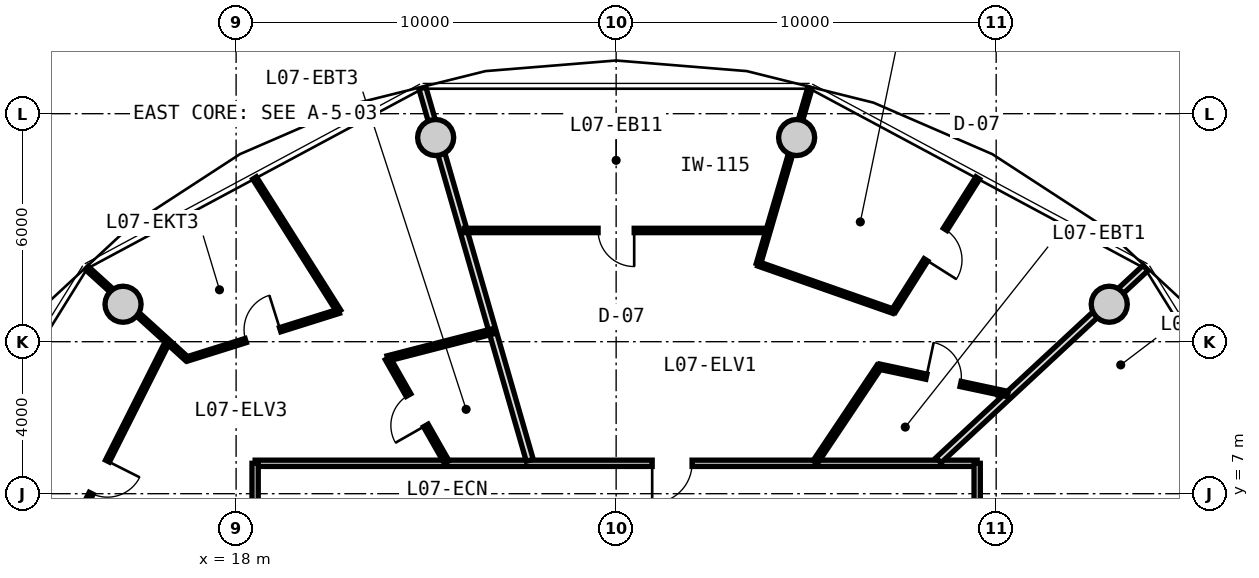
"""IFC4 building model, lengths in metres.
Left out: names, types, materials, properties, quantities, classifications, styles, units other than length and angle.
Written with IfcOpenShell. Run it as: python <this file> out.ifc"""

import sys

from ifc_helpers import new_model, si_unit, direction, frame, frame_2d, origin, origin_2d, place, context, subcontext, project, spatial, rectangle, circle, extrude, source, transform, mapped, element, fill, save


model = new_model("IFC4")
c1 = context("Model", 3, precision=1e-05, world=origin(), true_north=direction((0.0, 1.0)))
c2 = subcontext(c1, "Body", "Model", "MODEL_VIEW")
j1 = project(units=[si_unit("LENGTHUNIT", "METRE"), si_unit("PLANEANGLEUNIT", "RADIAN")], contexts=[c1])
p1 = place(None, origin())
s1 = spatial("IfcSite", under=j1, at=p1, CompositionType="ELEMENT")
p2 = place(p1, origin())
s2 = spatial("IfcBuilding", under=s1, at=p2, CompositionType="ELEMENT")
p3 = place(p2, frame((0.0, 0.0, 27.7)))
s3 = spatial("IfcBuildingStorey", under=s2, at=p3, CompositionType="ELEMENT", Elevation=27.7)
m1 = source(origin(), c2, "Body", "SweptSolid", [
    extrude(circle(Radius=0.475, at=origin_2d()), origin(), (0.0, 0.0, 1.0), 3.05),
])
for number, where, z_axis, x_axis in (
    (1, (40.975, 11.985, 0.0), (0.0, 0.0, 1.0), (1.0, 0.0, 0.0)),
    (2, (32.749, 16.373, 0.0), (0.0, 0.0, 1.0), (1.0, 0.0, 0.0)),
    (3, (23.251, 16.373, 0.0), (0.0, 0.0, 1.0), (1.0, 0.0, 0.0)),
    (4, (15.025, 11.985, 0.0), (0.0, 0.0, 1.0), (1.0, 0.0, 0.0)),
):
    element("IfcColumn", number, at=place(p3, frame(where, z_axis=z_axis, x_axis=x_axis)), inside=s3, PredefinedType="COLUMN", context=c2, shape_type="MappedRepresentation", body=[
        mapped(m1, transform((0.0, 0.0, 0.0), x_axis=(1.0, 0.0, 0.0), y_axis=(0.0, 1.0, 0.0), z_axis=(0.0, 0.0, 1.0), scale=1.0)),
    ])
m2 = source(origin(), c2, "Body", "SweptSolid", [
    extrude(rectangle(XDim=19.0, YDim=0.165, at=frame_2d((9.5, 0.0))), origin(), (0.0, 0.0, 1.0), 2.775),
])
p4 = place(p3, frame((18.5, 7.8, 0.0), z_axis=(0.0, 0.0, 1.0), x_axis=(1.0, 0.0, 0.0)))
e5 = element("IfcWall", 5, at=p4, inside=s3, PredefinedType="PARTITIONING", context=c2, shape_type="MappedRepresentation", body=[
    mapped(m2, transform((0.0, 0.0, 0.0), x_axis=(1.0, 0.0, 0.0), y_axis=(0.0, 1.0, 0.0), z_axis=(0.0, 0.0, 1.0), scale=1.0)),
])
p5 = place(p4, frame((10.448, 0.0, 0.0)))
e6 = element("IfcOpeningElement", 6, at=p5, cuts=e5, PredefinedType="OPENING", context=c2, shape_type="SweptSolid", body=[
    extrude(rectangle(XDim=1.05, YDim=2.15, at=frame_2d((0.525, 1.075))), frame((0.0, 0.093, 0.0), z_axis=(0.0, -1.0, 0.0), x_axis=(1.0, 0.0, 0.0)), (0.0, 0.0, 1.0), 0.185),
])
m3 = source(origin(), c2, "Body", "SweptSolid", [
    extrude(rectangle(XDim=15.6, YDim=0.165, at=frame_2d((7.8, 0.0))), origin(), (0.0, 0.0, 1.0), 2.775),
])
p6 = place(p3, frame((18.5, -7.8, 0.0), z_axis=(0.0, 0.0, 1.0), x_axis=(0.0, 1.0, 0.0)))
e7 = element("IfcWall", 7, at=p6, inside=s3, PredefinedType="PARTITIONING", context=c2, shape_type="MappedRepresentation", body=[
    mapped(m3, transform((0.0, 0.0, 0.0), x_axis=(1.0, 0.0, 0.0), y_axis=(0.0, 1.0, 0.0), z_axis=(0.0, 0.0, 1.0), scale=1.0)),
])
p7 = place(p6, frame((12.241, 0.0, 0.0)))
e8 = element("IfcOpeningElement", 8, at=p7, cuts=e7, PredefinedType="OPENING", context=c2, shape_type="SweptSolid", body=[
    extrude(rectangle(XDim=1.05, YDim=2.15, at=frame_2d((0.525, 1.075))), frame((0.0, 0.093, 0.0), z_axis=(0.0, -1.0, 0.0), x_axis=(1.0, 0.0, 0.0)), (0.0, 0.0, 1.0), 0.185),
])
p8 = place(p6, frame((3.63, 0.0, 0.0)))
e9 = element("IfcOpeningElement", 9, at=p8, cuts=e7, PredefinedType="OPENING", context=c2, shape_type="SweptSolid", body=[
    extrude(rectangle(XDim=1.05, YDim=2.15, at=frame_2d((0.525, 1.075))), frame((0.0, 0.093, 0.0), z_axis=(0.0, -1.0, 0.0), x_axis=(1.0, 0.0, 0.0)), (0.0, 0.0, 1.0), 0.185),
])
p9 = place(p3, frame((37.5, 7.8, 0.0), z_axis=(0.0, 0.0, 1.0), x_axis=(0.0, -1.0, 0.0)))
e10 = element("IfcWall", 10, at=p9, inside=s3, PredefinedType="PARTITIONING", context=c2, shape_type="MappedRepresentation", body=[
    mapped(m3, transform((0.0, 0.0, 0.0), x_axis=(1.0, 0.0, 0.0), y_axis=(0.0, 1.0, 0.0), z_axis=(0.0, 0.0, 1.0), scale=1.0)),
])
p10 = place(p9, frame((12.141, 0.0, 0.0)))
e11 = element("IfcOpeningElement", 11, at=p10, cuts=e10, PredefinedType="OPENING", context=c2, shape_type="SweptSolid", body=[
    extrude(rectangle(XDim=1.25, YDim=2.2, at=frame_2d((0.625, 1.1))), frame((0.0, 0.093, 0.0), z_axis=(0.0, -1.0, 0.0), x_axis=(1.0, 0.0, 0.0)), (0.0, 0.0, 1.0), 0.185),
])
p11 = place(p9, frame((6.196, 0.0, 0.0)))
e12 = element("IfcOpeningElement", 12, at=p11, cuts=e10, PredefinedType="OPENING", context=c2, shape_type="SweptSolid", body=[
    extrude(rectangle(XDim=1.05, YDim=2.15, at=frame_2d((0.525, 1.075))), frame((0.0, 0.093, 0.0), z_axis=(0.0, -1.0, 0.0), x_axis=(1.0, 0.0, 0.0)), (0.0, 0.0, 1.0), 0.185),
])
p12 = place(p9, frame((1.092, 0.0, 0.0)))
e13 = element("IfcOpeningElement", 13, at=p12, cuts=e10, PredefinedType="OPENING", context=c2, shape_type="SweptSolid", body=[
    extrude(rectangle(XDim=1.05, YDim=2.15, at=frame_2d((0.525, 1.075))), frame((0.0, 0.093, 0.0), z_axis=(0.0, -1.0, 0.0), x_axis=(1.0, 0.0, 0.0)), (0.0, 0.0, 1.0), 0.185),
])
m4 = source(origin(), c2, "Body", "SweptSolid", [
    extrude(rectangle(XDim=7.435, YDim=0.19, at=frame_2d((3.717, 0.0))), origin(), (0.0, 0.0, 1.0), 2.225),
])
p13 = place(p3, frame((36.483, 7.88, 0.0), z_axis=(0.0, 0.0, 1.0), x_axis=(0.732651956848, 0.680603489652, 0.0)))
e14 = element("IfcWall", 14, at=p13, inside=s3, PredefinedType="PARTITIONING", context=c2, shape_type="MappedRepresentation", body=[
    mapped(m4, transform((0.0, 0.0, 0.0), x_axis=(1.0, 0.0, 0.0), y_axis=(0.0, 1.0, 0.0), z_axis=(0.0, 0.0, 1.0), scale=1.0)),
])
m5 = source(origin(), c2, "Body", "SweptSolid", [
    extrude(rectangle(XDim=10.196, YDim=0.19, at=frame_2d((5.098, 0.0))), origin(), (0.0, 0.0, 1.0), 2.225),
])
p14 = place(p3, frame((25.727, 7.88, 0.0), z_axis=(0.0, 0.0, 1.0), x_axis=(-0.277136420347, 0.960830580549, 0.0)))
e15 = element("IfcWall", 15, at=p14, inside=s3, PredefinedType="PARTITIONING", context=c2, shape_type="MappedRepresentation", body=[
    mapped(m5, transform((0.0, 0.0, 0.0), x_axis=(1.0, 0.0, 0.0), y_axis=(0.0, 1.0, 0.0), z_axis=(0.0, 0.0, 1.0), scale=1.0)),
])
m6 = source(origin(), c2, "Body", "SweptSolid", [
    extrude(rectangle(XDim=7.993, YDim=0.115, at=frame_2d((3.996, 0.0))), origin(), (0.0, 0.0, 1.0), 2.775),
])
p15 = place(p3, frame((31.996, 13.927, 0.0), z_axis=(0.0, 0.0, 1.0), x_axis=(-1.0, 0.0, 0.0)))
e16 = element("IfcWall", 16, at=p15, inside=s3, PredefinedType="PARTITIONING", context=c2, shape_type="MappedRepresentation", body=[
    mapped(m6, transform((0.0, 0.0, 0.0), x_axis=(1.0, 0.0, 0.0), y_axis=(0.0, 1.0, 0.0), z_axis=(0.0, 0.0, 1.0), scale=1.0)),
])
p16 = place(p15, frame((3.521, 0.0, 0.0)))
e17 = element("IfcOpeningElement", 17, at=p16, cuts=e16, PredefinedType="OPENING", context=c2, shape_type="SweptSolid", body=[
    extrude(rectangle(XDim=0.95, YDim=2.1, at=frame_2d((0.475, 1.05))), frame((0.0, 0.067, 0.0), z_axis=(0.0, -1.0, 0.0), x_axis=(1.0, 0.0, 0.0)), (0.0, 0.0, 1.0), 0.135),
])
m7 = source(origin(), c2, "Body", "SweptSolid", [
    extrude(rectangle(XDim=4.829, YDim=0.115, at=frame_2d((2.415, 0.0))), origin(), (0.0, 0.0, 1.0), 2.225),
])
p17 = place(p3, frame((31.742, 13.042, 0.0), z_axis=(0.0, 0.0, 1.0), x_axis=(0.280838556456, 0.959755023539, 0.0)))
e18 = element("IfcWall", 18, at=p17, inside=s3, PredefinedType="PARTITIONING", context=c2, shape_type="MappedRepresentation", body=[
    mapped(m7, transform((0.0, 0.0, 0.0), x_axis=(1.0, 0.0, 0.0), y_axis=(0.0, 1.0, 0.0), z_axis=(0.0, 0.0, 1.0), scale=1.0)),
])
m8 = source(origin(), c2, "Body", "SweptSolid", [
    extrude(rectangle(XDim=3.025, YDim=0.14, at=frame_2d((1.513, 0.0))), origin(), (0.0, 0.0, 1.0), 2.775),
])
p18 = place(p3, frame((33.24, 7.83, 0.0), z_axis=(0.0, 0.0, 1.0), x_axis=(0.556189165904, 0.831055721195, 0.0)))
e19 = element("IfcWall", 19, at=p18, inside=s3, PredefinedType="PARTITIONING", context=c2, shape_type="MappedRepresentation", body=[
    mapped(m8, transform((0.0, 0.0, 0.0), x_axis=(1.0, 0.0, 0.0), y_axis=(0.0, 1.0, 0.0), z_axis=(0.0, 0.0, 1.0), scale=1.0)),
])
m9 = source(origin(), c2, "Body", "SweptSolid", [
    extrude(rectangle(XDim=3.459, YDim=0.14, at=frame_2d((1.729, 0.0))), origin(), (0.0, 0.0, 1.0), 2.775),
])
p19 = place(p3, frame((34.922, 10.344, 0.0), z_axis=(0.0, 0.0, 1.0), x_axis=(0.978006468578, -0.208574560815, 0.0)))
e20 = element("IfcWall", 20, at=p19, inside=s3, PredefinedType="PARTITIONING", context=c2, shape_type="MappedRepresentation", body=[
    mapped(m9, transform((0.0, 0.0, 0.0), x_axis=(1.0, 0.0, 0.0), y_axis=(0.0, 1.0, 0.0), z_axis=(0.0, 0.0, 1.0), scale=1.0)),
])
p20 = place(p19, frame((1.27, 0.0, 0.0)))
e21 = element("IfcOpeningElement", 21, at=p20, cuts=e20, PredefinedType="OPENING", context=c2, shape_type="SweptSolid", body=[
    extrude(rectangle(XDim=0.92, YDim=2.1, at=frame_2d((0.46, 1.05))), frame((0.0, 0.08, 0.0), z_axis=(0.0, -1.0, 0.0), x_axis=(1.0, 0.0, 0.0)), (0.0, 0.0, 1.0), 0.16),
])
m10 = source(origin(), c2, "Body", "SweptSolid", [
    extrude(rectangle(XDim=4.15, YDim=0.115, at=frame_2d((2.075, 0.0))), origin(), (0.0, 0.0, 1.0), 2.775),
])
p21 = place(p3, frame((35.296, 11.801, 0.0), z_axis=(0.0, 0.0, 1.0), x_axis=(0.534475378192, 0.845184045109, 0.0)))
e22 = element("IfcWall", 22, at=p21, inside=s3, PredefinedType="PARTITIONING", context=c2, shape_type="MappedRepresentation", body=[
    mapped(m10, transform((0.0, 0.0, 0.0), x_axis=(1.0, 0.0, 0.0), y_axis=(0.0, 1.0, 0.0), z_axis=(0.0, 0.0, 1.0), scale=1.0)),
])
p22 = place(p21, frame((1.6, 0.0, 0.0)))
e23 = element("IfcOpeningElement", 23, at=p22, cuts=e22, PredefinedType="OPENING", context=c2, shape_type="SweptSolid", body=[
    extrude(rectangle(XDim=0.95, YDim=2.1, at=frame_2d((0.475, 1.05))), frame((0.0, 0.067, 0.0), z_axis=(0.0, -1.0, 0.0), x_axis=(1.0, 0.0, 0.0)), (0.0, 0.0, 1.0), 0.135),
])
m11 = source(origin(), c2, "Body", "SweptSolid", [
    extrude(rectangle(XDim=3.765, YDim=0.115, at=frame_2d((1.882, 0.0))), origin(), (0.0, 0.0, 1.0), 2.775),
])
p23 = place(p3, frame((35.296, 11.801, 0.0), z_axis=(0.0, 0.0, 1.0), x_axis=(-0.943788572669, 0.330549739222, 0.0)))
e24 = element("IfcWall", 24, at=p23, inside=s3, PredefinedType="PARTITIONING", context=c2, shape_type="MappedRepresentation", body=[
    mapped(m11, transform((0.0, 0.0, 0.0), x_axis=(1.0, 0.0, 0.0), y_axis=(0.0, 1.0, 0.0), z_axis=(0.0, 0.0, 1.0), scale=1.0)),
])
m12 = source(origin(), c2, "Body", "SweptSolid", [
    extrude(rectangle(XDim=8.018, YDim=0.115, at=frame_2d((4.009, 0.0))), origin(), (0.0, 0.0, 1.0), 2.775),
])
p24 = place(p3, frame((16.205, 11.014, 0.0), z_axis=(0.0, 0.0, 1.0), x_axis=(-0.450134355233, -0.89296084026, 0.0)))
e25 = element("IfcWall", 25, at=p24, inside=s3, PredefinedType="PARTITIONING", context=c2, shape_type="MappedRepresentation", body=[
    mapped(m12, transform((0.0, 0.0, 0.0), x_axis=(1.0, 0.0, 0.0), y_axis=(0.0, 1.0, 0.0), z_axis=(0.0, 0.0, 1.0), scale=1.0)),
])
p25 = place(p24, frame((3.534, 0.0, 0.0)))
e26 = element("IfcOpeningElement", 26, at=p25, cuts=e25, PredefinedType="OPENING", context=c2, shape_type="SweptSolid", body=[
    extrude(rectangle(XDim=0.95, YDim=2.1, at=frame_2d((0.475, 1.05))), frame((0.0, 0.067, 0.0), z_axis=(0.0, -1.0, 0.0), x_axis=(1.0, 0.0, 0.0)), (0.0, 0.0, 1.0), 0.135),
])
m13 = source(origin(), c2, "Body", "SweptSolid", [
    extrude(rectangle(XDim=3.551, YDim=0.115, at=frame_2d((1.775, 0.0))), origin(), (0.0, 0.0, 1.0), 2.225),
])
p26 = place(p3, frame((16.698, 10.553, 0.0), z_axis=(0.0, 0.0, 1.0), x_axis=(-0.740291560769, 0.672285954824, 0.0)))
e27 = element("IfcWall", 27, at=p26, inside=s3, PredefinedType="PARTITIONING", context=c2, shape_type="MappedRepresentation", body=[
    mapped(m13, transform((0.0, 0.0, 0.0), x_axis=(1.0, 0.0, 0.0), y_axis=(0.0, 1.0, 0.0), z_axis=(0.0, 0.0, 1.0), scale=1.0)),
])
m14 = source(origin(), c2, "Body", "SweptSolid", [
    extrude(rectangle(XDim=3.141, YDim=0.14, at=frame_2d((1.571, 0.0))), origin(), (0.0, 0.0, 1.0), 2.775),
])
p27 = place(p3, frame((23.542, 7.83, 0.0), z_axis=(0.0, 0.0, 1.0), x_axis=(-0.494874486088, 0.868964465913, 0.0)))
e28 = element("IfcWall", 28, at=p27, inside=s3, PredefinedType="PARTITIONING", context=c2, shape_type="MappedRepresentation", body=[
    mapped(m14, transform((0.0, 0.0, 0.0), x_axis=(1.0, 0.0, 0.0), y_axis=(0.0, 1.0, 0.0), z_axis=(0.0, 0.0, 1.0), scale=1.0)),
])
p28 = place(p27, frame((1.111, 0.0, 0.0)))
e29 = element("IfcOpeningElement", 29, at=p28, cuts=e28, PredefinedType="OPENING", context=c2, shape_type="SweptSolid", body=[
    extrude(rectangle(XDim=0.92, YDim=2.1, at=frame_2d((0.46, 1.05))), frame((0.0, 0.08, 0.0), z_axis=(0.0, -1.0, 0.0), x_axis=(1.0, 0.0, 0.0)), (0.0, 0.0, 1.0), 0.16),
])
m15 = source(origin(), c2, "Body", "SweptSolid", [
    extrude(rectangle(XDim=2.868, YDim=0.14, at=frame_2d((1.434, 0.0))), origin(), (0.0, 0.0, 1.0), 2.775),
])
p29 = place(p3, frame((21.987, 10.56, 0.0), z_axis=(0.0, 0.0, 1.0), x_axis=(0.968467705195, 0.249139125778, 0.0)))
e30 = element("IfcWall", 30, at=p29, inside=s3, PredefinedType="PARTITIONING", context=c2, shape_type="MappedRepresentation", body=[
    mapped(m15, transform((0.0, 0.0, 0.0), x_axis=(1.0, 0.0, 0.0), y_axis=(0.0, 1.0, 0.0), z_axis=(0.0, 0.0, 1.0), scale=1.0)),
])
p30 = place(p3, frame((20.704, 11.801, 0.0), z_axis=(0.0, 0.0, 1.0), x_axis=(-0.534475378192, 0.845184045109, 0.0)))
e31 = element("IfcWall", 31, at=p30, inside=s3, PredefinedType="PARTITIONING", context=c2, shape_type="MappedRepresentation", body=[
    mapped(m10, transform((0.0, 0.0, 0.0), x_axis=(1.0, 0.0, 0.0), y_axis=(0.0, 1.0, 0.0), z_axis=(0.0, 0.0, 1.0), scale=1.0)),
])
m16 = source(origin(), c2, "Body", "SweptSolid", [
    extrude(rectangle(XDim=4.189, YDim=0.115, at=frame_2d((2.094, 0.0))), origin(), (0.0, 0.0, 1.0), 2.775),
])
p31 = place(p3, frame((20.704, 11.801, 0.0), z_axis=(0.0, 0.0, 1.0), x_axis=(-0.954002766053, -0.299797802467, 0.0)))
e32 = element("IfcWall", 32, at=p31, inside=s3, PredefinedType="PARTITIONING", context=c2, shape_type="MappedRepresentation", body=[
    mapped(m16, transform((0.0, 0.0, 0.0), x_axis=(1.0, 0.0, 0.0), y_axis=(0.0, 1.0, 0.0), z_axis=(0.0, 0.0, 1.0), scale=1.0)),
])
p32 = place(p31, frame((1.619, 0.0, 0.0)))
e33 = element("IfcOpeningElement", 33, at=p32, cuts=e32, PredefinedType="OPENING", context=c2, shape_type="SweptSolid", body=[
    extrude(rectangle(XDim=0.95, YDim=2.1, at=frame_2d((0.475, 1.05))), frame((0.0, 0.067, 0.0), z_axis=(0.0, -1.0, 0.0), x_axis=(1.0, 0.0, 0.0)), (0.0, 0.0, 1.0), 0.135),
])
m17 = source(origin(), c2, "Body", "SweptSolid", [
    extrude(rectangle(XDim=1.05, YDim=2.15, at=frame_2d((0.525, 1.075))), frame((0.0, 0.025, 0.0), z_axis=(0.0, -1.0, 0.0), x_axis=(1.0, 0.0, 0.0)), (0.0, 0.0, 1.0), 0.05),
])
p33 = place(p5, frame((1.05, 0.0, 0.0), z_axis=(0.0, 0.0, 1.0), x_axis=(-1.0, 0.0, 0.0)))
e34 = element("IfcDoor", 34, at=p33, inside=s3, OperationType="SINGLE_SWING_RIGHT", PredefinedType="DOOR", context=c2, shape_type="MappedRepresentation", body=[
    mapped(m17, transform((0.0, 0.0, 0.0), x_axis=(1.0, 0.0, 0.0), y_axis=(0.0, 1.0, 0.0), z_axis=(0.0, 0.0, 1.0), scale=1.0)),
])
fill(e6, e34)
m18 = source(origin(), c2, "Body", "SweptSolid", [
    extrude(rectangle(XDim=0.92, YDim=2.1, at=frame_2d((0.46, 1.05))), frame((0.0, 0.025, 0.0), z_axis=(0.0, -1.0, 0.0), x_axis=(1.0, 0.0, 0.0)), (0.0, 0.0, 1.0), 0.05),
])
p34 = place(p20, origin())
e35 = element("IfcDoor", 35, at=p34, inside=s3, OperationType="SINGLE_SWING_LEFT", PredefinedType="DOOR", context=c2, shape_type="MappedRepresentation", body=[
    mapped(m18, transform((0.0, 0.0, 0.0), x_axis=(1.0, 0.0, 0.0), y_axis=(0.0, 1.0, 0.0), z_axis=(0.0, 0.0, 1.0), scale=1.0)),
])
fill(e21, e35)
m19 = source(origin(), c2, "Body", "SweptSolid", [
    extrude(rectangle(XDim=0.95, YDim=2.1, at=frame_2d((0.475, 1.05))), frame((0.0, 0.025, 0.0), z_axis=(0.0, -1.0, 0.0), x_axis=(1.0, 0.0, 0.0)), (0.0, 0.0, 1.0), 0.05),
])
p35 = place(p22, frame((0.95, 0.0, 0.0), z_axis=(0.0, 0.0, 1.0), x_axis=(-1.0, 0.0, 0.0)))
e36 = element("IfcDoor", 36, at=p35, inside=s3, OperationType="SINGLE_SWING_RIGHT", PredefinedType="DOOR", context=c2, shape_type="MappedRepresentation", body=[
    mapped(m19, transform((0.0, 0.0, 0.0), x_axis=(1.0, 0.0, 0.0), y_axis=(0.0, 1.0, 0.0), z_axis=(0.0, 0.0, 1.0), scale=1.0)),
])
fill(e23, e36)
p36 = place(p16, origin())
e37 = element("IfcDoor", 37, at=p36, inside=s3, OperationType="SINGLE_SWING_LEFT", PredefinedType="DOOR", context=c2, shape_type="MappedRepresentation", body=[
    mapped(m19, transform((0.0, 0.0, 0.0), x_axis=(1.0, 0.0, 0.0), y_axis=(0.0, 1.0, 0.0), z_axis=(0.0, 0.0, 1.0), scale=1.0)),
])
fill(e17, e37)
p37 = place(p28, origin())
e38 = element("IfcDoor", 38, at=p37, inside=s3, OperationType="SINGLE_SWING_LEFT", PredefinedType="DOOR", context=c2, shape_type="MappedRepresentation", body=[
    mapped(m18, transform((0.0, 0.0, 0.0), x_axis=(1.0, 0.0, 0.0), y_axis=(0.0, 1.0, 0.0), z_axis=(0.0, 0.0, 1.0), scale=1.0)),
])
fill(e29, e38)
p38 = place(p32, frame((0.95, 0.0, 0.0), z_axis=(0.0, 0.0, 1.0), x_axis=(-1.0, 0.0, 0.0)))
e39 = element("IfcDoor", 39, at=p38, inside=s3, OperationType="SINGLE_SWING_RIGHT", PredefinedType="DOOR", context=c2, shape_type="MappedRepresentation", body=[
    mapped(m19, transform((0.0, 0.0, 0.0), x_axis=(1.0, 0.0, 0.0), y_axis=(0.0, 1.0, 0.0), z_axis=(0.0, 0.0, 1.0), scale=1.0)),
])
fill(e33, e39)
p39 = place(p25, origin())
e40 = element("IfcDoor", 40, at=p39, inside=s3, OperationType="SINGLE_SWING_LEFT", PredefinedType="DOOR", context=c2, shape_type="MappedRepresentation", body=[
    mapped(m19, transform((0.0, 0.0, 0.0), x_axis=(1.0, 0.0, 0.0), y_axis=(0.0, 1.0, 0.0), z_axis=(0.0, 0.0, 1.0), scale=1.0)),
])
fill(e26, e40)
save(model, sys.argv[1])
